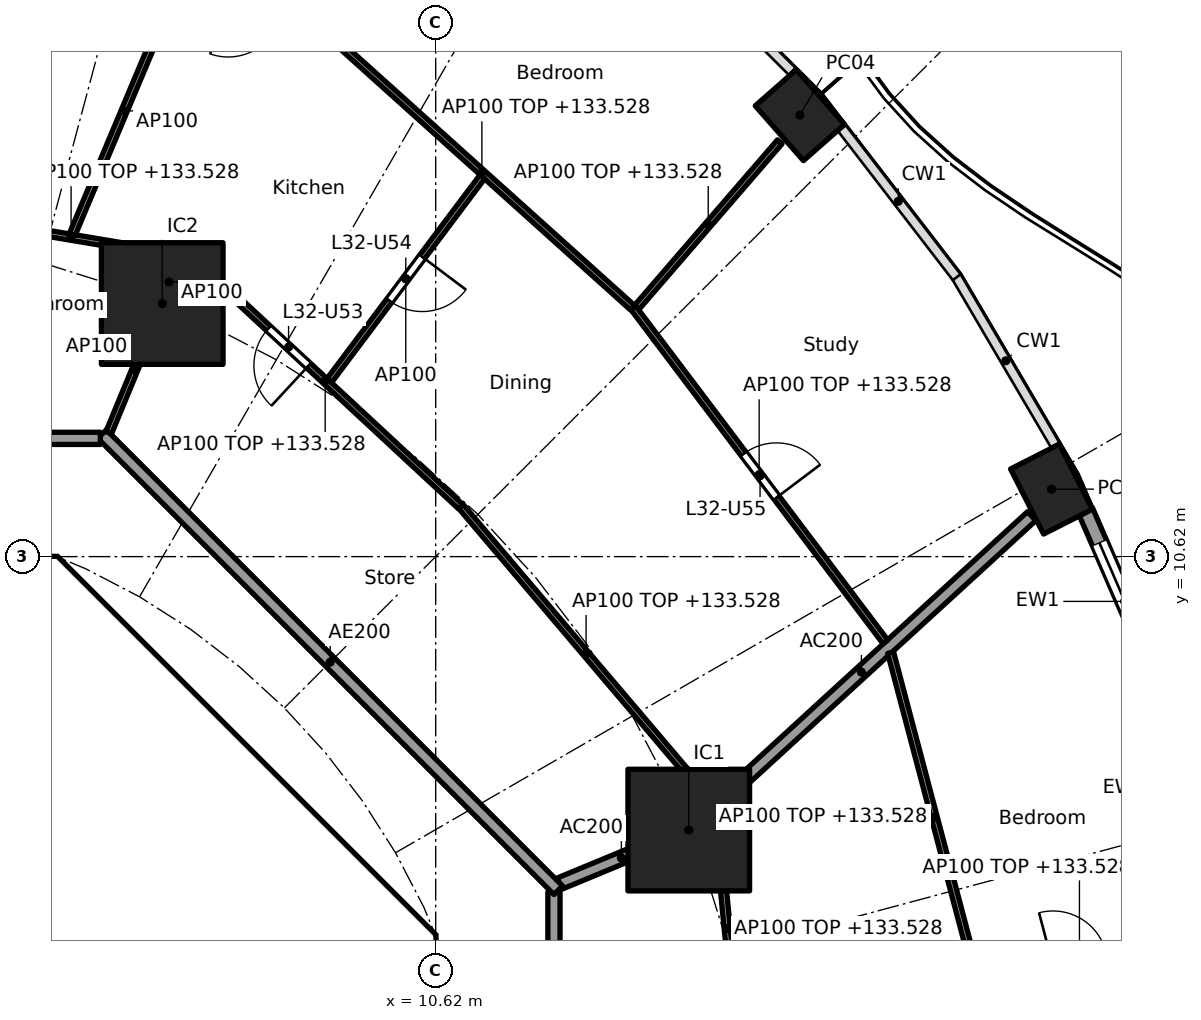
"""IFC4 building model, lengths in metres.
Left out: names, types, materials, properties, quantities, classifications, styles, units other than length and angle.
Written with IfcOpenShell. Run it as: python <this file> out.ifc"""

import sys

from ifc_helpers import new_model, si_unit, direction, frame, frame_2d, origin, origin_2d, place, context, subcontext, project, spatial, polyline, rectangle, hollow_rectangle, outline, extrude, element, fill, save


model = new_model("IFC4")
c1 = context("Model", 3, precision=1e-05, world=origin(), true_north=direction((0.0, 1.0)))
c2 = subcontext(c1, "Body", "Model", "MODEL_VIEW")
j1 = project(units=[si_unit("LENGTHUNIT", "METRE"), si_unit("PLANEANGLEUNIT", "RADIAN")], contexts=[c1])
p1 = place(None, origin())
s1 = spatial("IfcSite", under=j1, at=p1, CompositionType="ELEMENT")
p2 = place(p1, origin())
s2 = spatial("IfcBuilding", under=s1, at=p2, CompositionType="ELEMENT")
p3 = place(p2, frame((0.0, 0.0, 130.7)))
s3 = spatial("IfcBuildingStorey", under=s2, at=p3, CompositionType="ELEMENT", Elevation=130.7)
for number, where, z_axis, x_axis in (
    (1, (20.747, 11.73, 0.0), (0.0, 0.0, 1.0), (-0.452, 0.892, 0.0)),
    (2, (16.61, 17.88, 0.0), (0.0, 0.0, 1.0), (-0.66, 0.751, 0.0)),
):
    element("IfcColumn", number, at=place(p3, frame(where, z_axis=z_axis, x_axis=x_axis)), inside=s3, PredefinedType="COLUMN", context=c2, shape_type="SweptSolid", body=[
        extrude(hollow_rectangle(XDim=1.2, YDim=0.9, WallThickness=0.04, at=origin_2d()), origin(), (0.0, 0.0, 1.0), 3.7),
    ])
for number, where, z_axis, x_axis in (
    (3, (14.782, 6.123, 0.0), (0.0, 0.0, 1.0), (1.0, 0.0, 0.0)),
    (4, (6.123, 14.782, 0.0), (0.0, 0.0, 1.0), (1.0, 0.0, 0.0)),
):
    element("IfcColumn", number, at=place(p3, frame(where, z_axis=z_axis, x_axis=x_axis)), inside=s3, PredefinedType="COLUMN", context=c2, shape_type="SweptSolid", body=[
        extrude(rectangle(XDim=2.0, YDim=2.0, at=origin_2d()), origin(), (0.0, 0.0, 1.0), 3.7),
    ])
p4 = place(p3, frame((21.304, 11.38, 0.0), z_axis=(0.0, 0.0, 1.0), x_axis=(0.397575919276, -0.917569282622, 0.0)))
e5 = element("IfcWall", 5, at=p4, inside=s3, PredefinedType="SOLIDWALL", context=c2, shape_type="SweptSolid", body=[
    extrude(rectangle(XDim=3.261, YDim=0.25, at=frame_2d((1.63, 0.0))), origin(), (0.0, 0.0, 1.0), 3.44),
])
p5 = place(p4, frame((0.58, 0.0, 0.0)))
e6 = element("IfcOpeningElement", 6, at=p5, cuts=e5, PredefinedType="OPENING", context=c2, shape_type="SweptSolid", body=[
    extrude(rectangle(XDim=2.1, YDim=2.4, at=frame_2d((1.05, 1.2))), frame((0.0, 0.135, 0.0), z_axis=(0.0, -1.0, 0.0), x_axis=(1.0, 0.0, 0.0)), (0.0, 0.0, 1.0), 0.27),
])
p6 = place(p3, frame((9.988, 4.613, 0.0), z_axis=(0.0, 0.0, 1.0), x_axis=(-0.707106781187, 0.707106781187, 0.0)))
e7 = element("IfcWall", 7, at=p6, inside=s3, PredefinedType="SHEAR", context=c2, shape_type="SweptSolid", body=[
    extrude(rectangle(XDim=7.602, YDim=0.6, at=frame_2d((3.801, 0.0))), origin(), (0.0, 0.0, 1.0), 3.44),
])
p7 = place(p6, frame((3.201, 0.0, 0.0)))
e8 = element("IfcOpeningElement", 8, at=p7, cuts=e7, PredefinedType="OPENING", context=c2, shape_type="SweptSolid", body=[
    extrude(rectangle(XDim=1.2, YDim=2.1, at=frame_2d((0.6, 1.05))), frame((0.0, 0.31, 0.0), z_axis=(0.0, -1.0, 0.0), x_axis=(1.0, 0.0, 0.0)), (0.0, 0.0, 1.0), 0.62),
])
p8 = place(p3, origin())
e9 = element("IfcWall", 9, at=p8, inside=s3, PredefinedType="SHEAR", context=c2, shape_type="SweptSolid", body=[
    extrude(outline(polyline([(-4.152, 10.025), (-4.401, 9.776), (-4.825, 10.2), (-4.401, 10.625), (4.401, 10.625), (4.825, 10.2), (4.401, 9.776), (4.152, 10.025), (-4.152, 10.025)])), origin(), (0.0, 0.0, 1.0), 3.44),
])
p9 = place(p3, origin())
e10 = element("IfcWall", 10, at=p9, inside=s3, PredefinedType="SHEAR", context=c2, shape_type="SweptSolid", body=[
    extrude(outline(polyline([(9.776, -4.401), (10.025, -4.152), (10.025, -3.801), (10.025, 4.152), (9.776, 4.401), (10.2, 4.825), (10.625, 4.401), (10.625, -4.401), (10.2, -4.825), (9.776, -4.401)])), origin(), (0.0, 0.0, 1.0), 3.44),
])
p10 = place(p3, frame((12.657, 5.243, 0.0), z_axis=(0.0, 0.0, 1.0), x_axis=(0.923876145736, 0.382691608661, 0.0)))
e11 = element("IfcWall", 11, at=p10, inside=s3, PredefinedType="PARTITIONING", context=c2, shape_type="SweptSolid", body=[
    extrude(rectangle(XDim=2.2, YDim=0.2, at=frame_2d((1.1, 0.0))), origin(), (0.0, 0.0, 1.0), 3.44),
])
p11 = place(p3, frame((14.819, 6.157, 0.0), z_axis=(0.0, 0.0, 1.0), x_axis=(0.737608883396, 0.675228209671, 0.0)))
e12 = element("IfcWall", 12, at=p11, inside=s3, PredefinedType="PARTITIONING", context=c2, shape_type="SweptSolid", body=[
    extrude(rectangle(XDim=7.596, YDim=0.2, at=frame_2d((3.798, 0.0))), origin(), (0.0, 0.0, 1.0), 3.44),
])
p12 = place(p3, frame((12.565, -5.104, 0.0), z_axis=(0.0, 0.0, 1.0), x_axis=(0.0, 1.0, 0.0)))
e13 = element("IfcWall", 13, at=p12, inside=s3, PredefinedType="PARTITIONING", context=c2, shape_type="SweptSolid", body=[
    extrude(rectangle(XDim=10.209, YDim=0.2, at=frame_2d((5.104, 0.0))), origin(), (0.0, 0.0, 1.0), 3.44),
])
p13 = place(p3, frame((12.635, 5.134, 0.0), z_axis=(0.0, 0.0, 1.0), x_axis=(-0.707106781187, 0.707106781187, 0.0)))
e14 = element("IfcWall", 14, at=p13, inside=s3, PredefinedType="PARTITIONING", context=c2, shape_type="SweptSolid", body=[
    extrude(rectangle(XDim=10.609, YDim=0.2, at=frame_2d((5.305, 0.0))), origin(), (0.0, 0.0, 1.0), 3.44),
])
p14 = place(p3, frame((5.104, 12.565, 0.0), z_axis=(0.0, 0.0, 1.0), x_axis=(-1.0, 0.0, 0.0)))
e15 = element("IfcWall", 15, at=p14, inside=s3, PredefinedType="PARTITIONING", context=c2, shape_type="SweptSolid", body=[
    extrude(rectangle(XDim=10.409, YDim=0.2, at=frame_2d((5.205, 0.0))), origin(), (0.0, 0.0, 1.0), 3.44),
])
p15 = place(p14, frame((4.604, 0.0, 0.0)))
e16 = element("IfcOpeningElement", 16, at=p15, cuts=e15, PredefinedType="OPENING", context=c2, shape_type="SweptSolid", body=[
    extrude(rectangle(XDim=1.0, YDim=2.1, at=frame_2d((0.5, 1.05))), frame((0.0, 0.11, 0.0), z_axis=(0.0, -1.0, 0.0), x_axis=(1.0, 0.0, 0.0)), (0.0, 0.0, 1.0), 0.22),
])
p16 = place(p3, frame((15.602, 2.584, 0.0), z_axis=(0.0, 0.0, 1.0), x_axis=(-0.097196343206, 0.995265226393, 0.0)))
e17 = element("IfcWall", 17, at=p16, inside=s3, PredefinedType="PARTITIONING", context=c2, shape_type="SweptSolid", body=[
    extrude(rectangle(XDim=3.856, YDim=0.1, at=frame_2d((1.928, 0.0))), origin(), (0.0, 0.0, 1.0), 2.828),
])
p17 = place(p3, frame((19.598, 3.584, 0.0), z_axis=(0.0, 0.0, 1.0), x_axis=(0.967108750962, 0.254363251695, 0.0)))
e18 = element("IfcWall", 18, at=p17, inside=s3, PredefinedType="PARTITIONING", context=c2, shape_type="SweptSolid", body=[
    extrude(rectangle(XDim=3.327, YDim=0.1, at=frame_2d((1.663, 0.0))), origin(), (0.0, 0.0, 1.0), 2.828),
])
p18 = place(p17, frame((1.213, 0.0, 0.0)))
e19 = element("IfcOpeningElement", 19, at=p18, cuts=e18, PredefinedType="OPENING", context=c2, shape_type="SweptSolid", body=[
    extrude(rectangle(XDim=0.9, YDim=2.1, at=frame_2d((0.45, 1.05))), frame((0.0, 0.06, 0.0), z_axis=(0.0, -1.0, 0.0), x_axis=(1.0, 0.0, 0.0)), (0.0, 0.0, 1.0), 0.12),
])
p19 = place(p3, frame((19.537, 3.62, 0.0), z_axis=(0.0, 0.0, 1.0), x_axis=(-0.255909310473, 0.966700793841, 0.0)))
e20 = element("IfcWall", 20, at=p19, inside=s3, PredefinedType="PARTITIONING", context=c2, shape_type="SweptSolid", body=[
    extrude(rectangle(XDim=5.609, YDim=0.1, at=frame_2d((2.804, 0.0))), origin(), (0.0, 0.0, 1.0), 2.828),
])
p20 = place(p3, frame((15.153, 6.597, 0.0), z_axis=(0.0, 0.0, 1.0), x_axis=(-0.647372160855, 0.762174051874, 0.0)))
e21 = element("IfcWall", 21, at=p20, inside=s3, PredefinedType="PARTITIONING", context=c2, shape_type="SweptSolid", body=[
    extrude(rectangle(XDim=6.363, YDim=0.1, at=frame_2d((3.181, 0.0))), origin(), (0.0, 0.0, 1.0), 2.828),
])
p21 = place(p3, frame((18.016, 9.218, 0.0), z_axis=(0.0, 0.0, 1.0), x_axis=(-0.602411163107, 0.798185937338, 0.0)))
e22 = element("IfcWall", 22, at=p21, inside=s3, PredefinedType="PARTITIONING", context=c2, shape_type="SweptSolid", body=[
    extrude(rectangle(XDim=6.894, YDim=0.1, at=frame_2d((3.447, 0.0))), origin(), (0.0, 0.0, 1.0), 2.828),
])
p22 = place(p21, frame((2.972, 0.0, 0.0)))
e23 = element("IfcOpeningElement", 23, at=p22, cuts=e22, PredefinedType="OPENING", context=c2, shape_type="SweptSolid", body=[
    extrude(rectangle(XDim=0.9, YDim=2.1, at=frame_2d((0.45, 1.05))), frame((0.0, 0.06, 0.0), z_axis=(0.0, -1.0, 0.0), x_axis=(1.0, 0.0, 0.0)), (0.0, 0.0, 1.0), 0.12),
])
p23 = place(p3, frame((11.029, 11.443, 0.0), z_axis=(0.0, 0.0, 1.0), x_axis=(-0.733121281629, 0.680097924143, 0.0)))
e24 = element("IfcWall", 24, at=p23, inside=s3, PredefinedType="PARTITIONING", context=c2, shape_type="SweptSolid", body=[
    extrude(rectangle(XDim=6.073, YDim=0.1, at=frame_2d((3.037, 0.0))), origin(), (0.0, 0.0, 1.0), 2.828),
])
p24 = place(p23, frame((3.408, 0.0, 0.0)))
e25 = element("IfcOpeningElement", 25, at=p24, cuts=e24, PredefinedType="OPENING", context=c2, shape_type="SweptSolid", body=[
    extrude(rectangle(XDim=0.9, YDim=2.1, at=frame_2d((0.45, 1.05))), frame((0.0, 0.06, 0.0), z_axis=(0.0, -1.0, 0.0), x_axis=(1.0, 0.0, 0.0)), (0.0, 0.0, 1.0), 0.12),
])
p25 = place(p3, frame((13.926, 14.719, 0.0), z_axis=(0.0, 0.0, 1.0), x_axis=(0.653831857253, 0.756639876323, 0.0)))
e26 = element("IfcWall", 26, at=p25, inside=s3, PredefinedType="PARTITIONING", context=c2, shape_type="SweptSolid", body=[
    extrude(rectangle(XDim=3.598, YDim=0.1, at=frame_2d((1.799, 0.0))), origin(), (0.0, 0.0, 1.0), 2.828),
])
p26 = place(p3, frame((13.856, 14.714, 0.0), z_axis=(0.0, 0.0, 1.0), x_axis=(-0.743793479211, 0.668409500444, 0.0)))
e27 = element("IfcWall", 27, at=p26, inside=s3, PredefinedType="PARTITIONING", context=c2, shape_type="SweptSolid", body=[
    extrude(rectangle(XDim=6.659, YDim=0.1, at=frame_2d((3.329, 0.0))), origin(), (0.0, 0.0, 1.0), 2.828),
])
p27 = place(p3, frame((8.87, 13.514, 0.0), z_axis=(0.0, 0.0, 1.0), x_axis=(0.600475102839, 0.79964345234, 0.0)))
e28 = element("IfcWall", 28, at=p27, inside=s3, PredefinedType="PARTITIONING", context=c2, shape_type="SweptSolid", body=[
    extrude(rectangle(XDim=4.192, YDim=0.1, at=frame_2d((2.096, 0.0))), origin(), (0.0, 0.0, 1.0), 3.44),
])
p28 = place(p27, frame((1.646, 0.0, 0.0)))
e29 = element("IfcOpeningElement", 29, at=p28, cuts=e28, PredefinedType="OPENING", context=c2, shape_type="SweptSolid", body=[
    extrude(rectangle(XDim=0.9, YDim=2.1, at=frame_2d((0.45, 1.05))), frame((0.0, 0.06, 0.0), z_axis=(0.0, -1.0, 0.0), x_axis=(1.0, 0.0, 0.0)), (0.0, 0.0, 1.0), 0.12),
])
p29 = place(p3, frame((5.243, 12.657, 0.0), z_axis=(0.0, 0.0, 1.0), x_axis=(0.382719158442, 0.923864733477, 0.0)))
e30 = element("IfcWall", 30, at=p29, inside=s3, PredefinedType="PARTITIONING", context=c2, shape_type="SweptSolid", body=[
    extrude(rectangle(XDim=2.25, YDim=0.1, at=frame_2d((1.125, 0.0))), origin(), (0.0, 0.0, 1.0), 3.44),
])
p30 = place(p3, frame((6.564, 15.547, 0.0), z_axis=(0.0, 0.0, 1.0), x_axis=(-0.986269521186, 0.165143669511, 0.0)))
e31 = element("IfcWall", 31, at=p30, inside=s3, PredefinedType="PARTITIONING", context=c2, shape_type="SweptSolid", body=[
    extrude(rectangle(XDim=3.934, YDim=0.1, at=frame_2d((1.967, 0.0))), origin(), (0.0, 0.0, 1.0), 2.828),
])
p31 = place(p3, frame((4.643, 15.918, 0.0), z_axis=(0.0, 0.0, 1.0), x_axis=(0.387539433367, 0.921853126906, 0.0)))
e32 = element("IfcWall", 32, at=p31, inside=s3, PredefinedType="PARTITIONING", context=c2, shape_type="SweptSolid", body=[
    extrude(rectangle(XDim=4.408, YDim=0.1, at=frame_2d((2.204, 0.0))), origin(), (0.0, 0.0, 1.0), 3.44),
])
p32 = place(p3, frame((6.417, 15.42, 0.0), z_axis=(0.0, 0.0, 1.0), x_axis=(-0.543777264953, -0.839229578911, 0.0)))
e33 = element("IfcWall", 33, at=p32, inside=s3, PredefinedType="PARTITIONING", context=c2, shape_type="SweptSolid", body=[
    extrude(rectangle(XDim=0.673, YDim=0.1, at=frame_2d((0.337, 0.0))), origin(), (0.0, 0.0, 1.0), 3.44),
])
p33 = place(p5, origin())
e34 = element("IfcDoor", 34, at=p33, inside=s3, OperationType="SLIDING_TO_LEFT", PredefinedType="DOOR", context=c2, shape_type="SweptSolid", body=[
    extrude(rectangle(XDim=2.1, YDim=2.4, at=frame_2d((1.05, 1.2))), frame((0.0, 0.025, 0.0), z_axis=(0.0, -1.0, 0.0), x_axis=(1.0, 0.0, 0.0)), (0.0, 0.0, 1.0), 0.05),
])
fill(e6, e34)
p34 = place(p7, origin())
e35 = element("IfcDoor", 35, at=p34, inside=s3, OperationType="SINGLE_SWING_LEFT", PredefinedType="DOOR", context=c2, shape_type="SweptSolid", body=[
    extrude(rectangle(XDim=1.2, YDim=2.1, at=frame_2d((0.6, 1.05))), frame((0.0, 0.025, 0.0), z_axis=(0.0, -1.0, 0.0), x_axis=(1.0, 0.0, 0.0)), (0.0, 0.0, 1.0), 0.05),
])
fill(e8, e35)
p35 = place(p24, origin())
e36 = element("IfcDoor", 36, at=p35, inside=s3, OperationType="SINGLE_SWING_LEFT", PredefinedType="DOOR", context=c2, shape_type="SweptSolid", body=[
    extrude(rectangle(XDim=0.9, YDim=2.1, at=frame_2d((0.45, 1.05))), frame((0.0, 0.025, 0.0), z_axis=(0.0, -1.0, 0.0), x_axis=(1.0, 0.0, 0.0)), (0.0, 0.0, 1.0), 0.05),
])
fill(e25, e36)
p36 = place(p28, frame((0.9, 0.0, 0.0), x_axis=(-1.0, 0.0, 0.0)))
e37 = element("IfcDoor", 37, at=p36, inside=s3, OperationType="SINGLE_SWING_LEFT", PredefinedType="DOOR", context=c2, shape_type="SweptSolid", body=[
    extrude(rectangle(XDim=0.9, YDim=2.1, at=frame_2d((0.45, 1.05))), frame((0.0, 0.025, 0.0), z_axis=(0.0, -1.0, 0.0), x_axis=(1.0, 0.0, 0.0)), (0.0, 0.0, 1.0), 0.05),
])
fill(e29, e37)
p37 = place(p22, frame((0.9, 0.0, 0.0), x_axis=(-1.0, 0.0, 0.0)))
e38 = element("IfcDoor", 38, at=p37, inside=s3, OperationType="SINGLE_SWING_RIGHT", PredefinedType="DOOR", context=c2, shape_type="SweptSolid", body=[
    extrude(rectangle(XDim=0.9, YDim=2.1, at=frame_2d((0.45, 1.05))), frame((0.0, 0.025, 0.0), z_axis=(0.0, -1.0, 0.0), x_axis=(1.0, 0.0, 0.0)), (0.0, 0.0, 1.0), 0.05),
])
fill(e23, e38)
save(model, sys.argv[1])
